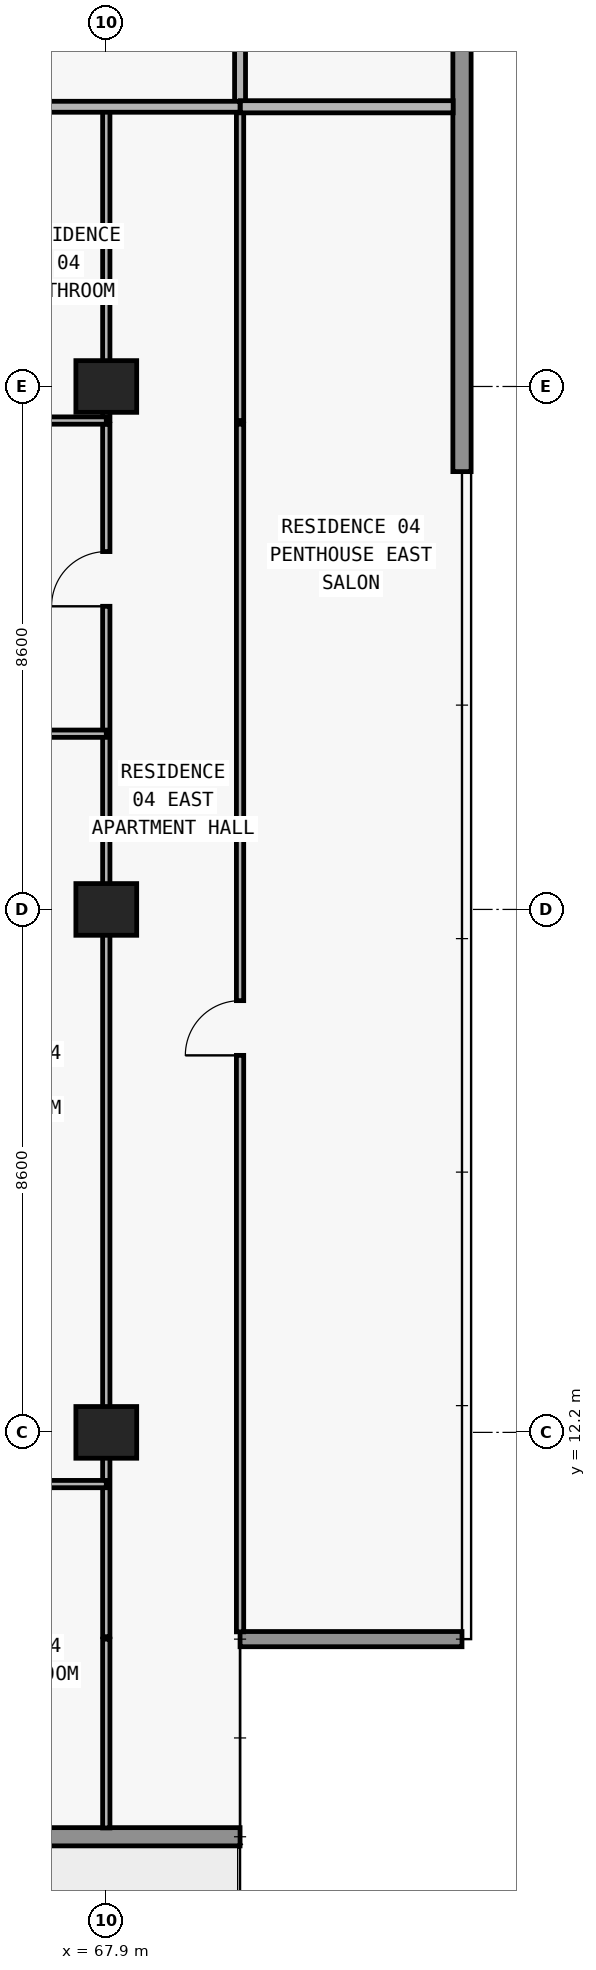
"""IFC4 building model, lengths in metres.
Left out: names, types, materials, properties, quantities, classifications, styles, units other than length and angle.
Written with IfcOpenShell. Run it as: python <this file> out.ifc"""

import sys

from ifc_helpers import new_model, si_unit, direction, frame, frame_2d, origin, origin_2d, place, context, subcontext, project, spatial, rectangle, extrude, element, fill, save


model = new_model("IFC4")
c1 = context("Model", 3, precision=1e-05, world=origin(), true_north=direction((0.0, 1.0)))
c2 = subcontext(c1, "Body", "Model", "MODEL_VIEW")
j1 = project(units=[si_unit("LENGTHUNIT", "METRE"), si_unit("PLANEANGLEUNIT", "RADIAN")], contexts=[c1])
p1 = place(None, origin())
s1 = spatial("IfcSite", under=j1, at=p1, CompositionType="ELEMENT")
p2 = place(p1, origin())
s2 = spatial("IfcBuilding", under=s1, at=p2, CompositionType="ELEMENT")
p3 = place(p2, frame((0.0, 0.0, 132.3)))
s3 = spatial("IfcBuildingStorey", under=s2, at=p3, CompositionType="ELEMENT", Elevation=132.3)
for number, where, z_axis, x_axis in (
    (1, (67.9, 12.2, 0.0), (0.0, 0.0, 1.0), (1.0, 0.0, 0.0)),
    (2, (67.9, 20.8, 0.0), (0.0, 0.0, 1.0), (1.0, 0.0, 0.0)),
    (3, (67.9, 29.4, 0.0), (0.0, 0.0, 1.0), (1.0, 0.0, 0.0)),
):
    element("IfcColumn", number, at=place(p3, frame(where, z_axis=z_axis, x_axis=x_axis)), inside=s3, PredefinedType="COLUMN", context=c2, shape_type="SweptSolid", body=[
        extrude(rectangle(XDim=1.0, YDim=0.85, at=origin_2d()), origin(), (0.0, 0.0, 1.0), 3.05),
    ])
p4 = place(p3, frame((70.1, 5.55, 0.0), z_axis=(0.0, 0.0, 1.0), x_axis=(-1.0, 0.0, 0.0)))
e4 = element("IfcWall", 4, at=p4, inside=s3, PredefinedType="STANDARD", context=c2, shape_type="SweptSolid", body=[
    extrude(rectangle(XDim=62.4, YDim=0.3, at=frame_2d((31.2, 0.0))), origin(), (0.0, 0.0, 1.0), 3.05),
])
p5 = place(p4, frame((57.29, 0.0, 0.0)))
e5 = element("IfcOpeningElement", 5, at=p5, cuts=e4, PredefinedType="OPENING", context=c2, shape_type="SweptSolid", body=[
    extrude(rectangle(XDim=2.0, YDim=2.3, at=frame_2d((1.0, 1.15))), frame((0.0, 0.16, 0.0), z_axis=(0.0, -1.0, 0.0), x_axis=(1.0, 0.0, 0.0)), (0.0, 0.0, 1.0), 0.32),
])
p6 = place(p4, frame((52.61, 0.0, 0.65)))
e6 = element("IfcOpeningElement", 6, at=p6, cuts=e4, PredefinedType="OPENING", context=c2, shape_type="SweptSolid", body=[
    extrude(rectangle(XDim=2.6, YDim=1.85, at=frame_2d((1.3, 0.925))), frame((0.0, 0.16, 0.0), z_axis=(0.0, -1.0, 0.0), x_axis=(1.0, 0.0, 0.0)), (0.0, 0.0, 1.0), 0.32),
])
p7 = place(p4, frame((46.5, 0.0, 0.85)))
e7 = element("IfcOpeningElement", 7, at=p7, cuts=e4, PredefinedType="OPENING", context=c2, shape_type="SweptSolid", body=[
    extrude(rectangle(XDim=2.2, YDim=1.55, at=frame_2d((1.1, 0.775))), frame((0.0, 0.16, 0.0), z_axis=(0.0, -1.0, 0.0), x_axis=(1.0, 0.0, 0.0)), (0.0, 0.0, 1.0), 0.32),
])
p8 = place(p4, frame((40.49, 0.0, 0.0)))
e8 = element("IfcOpeningElement", 8, at=p8, cuts=e4, PredefinedType="OPENING", context=c2, shape_type="SweptSolid", body=[
    extrude(rectangle(XDim=2.0, YDim=2.3, at=frame_2d((1.0, 1.15))), frame((0.0, 0.16, 0.0), z_axis=(0.0, -1.0, 0.0), x_axis=(1.0, 0.0, 0.0)), (0.0, 0.0, 1.0), 0.32),
])
p9 = place(p4, frame((35.81, 0.0, 0.65)))
e9 = element("IfcOpeningElement", 9, at=p9, cuts=e4, PredefinedType="OPENING", context=c2, shape_type="SweptSolid", body=[
    extrude(rectangle(XDim=2.6, YDim=1.85, at=frame_2d((1.3, 0.925))), frame((0.0, 0.16, 0.0), z_axis=(0.0, -1.0, 0.0), x_axis=(1.0, 0.0, 0.0)), (0.0, 0.0, 1.0), 0.32),
])
p10 = place(p4, frame((30.1, 0.0, 0.85)))
e10 = element("IfcOpeningElement", 10, at=p10, cuts=e4, PredefinedType="OPENING", context=c2, shape_type="SweptSolid", body=[
    extrude(rectangle(XDim=2.2, YDim=1.55, at=frame_2d((1.1, 0.775))), frame((0.0, 0.16, 0.0), z_axis=(0.0, -1.0, 0.0), x_axis=(1.0, 0.0, 0.0)), (0.0, 0.0, 1.0), 0.32),
])
p11 = place(p4, frame((22.1, 0.0, 0.85)))
e11 = element("IfcOpeningElement", 11, at=p11, cuts=e4, PredefinedType="OPENING", context=c2, shape_type="SweptSolid", body=[
    extrude(rectangle(XDim=2.2, YDim=1.55, at=frame_2d((1.1, 0.775))), frame((0.0, 0.16, 0.0), z_axis=(0.0, -1.0, 0.0), x_axis=(1.0, 0.0, 0.0)), (0.0, 0.0, 1.0), 0.32),
])
p12 = place(p4, frame((16.026, 0.0, 0.0)))
e12 = element("IfcOpeningElement", 12, at=p12, cuts=e4, PredefinedType="OPENING", context=c2, shape_type="SweptSolid", body=[
    extrude(rectangle(XDim=2.0, YDim=2.3, at=frame_2d((1.0, 1.15))), frame((0.0, 0.16, 0.0), z_axis=(0.0, -1.0, 0.0), x_axis=(1.0, 0.0, 0.0)), (0.0, 0.0, 1.0), 0.32),
])
p13 = place(p4, frame((11.726, 0.0, 0.85)))
e13 = element("IfcOpeningElement", 13, at=p13, cuts=e4, PredefinedType="OPENING", context=c2, shape_type="SweptSolid", body=[
    extrude(rectangle(XDim=2.2, YDim=1.55, at=frame_2d((1.1, 0.775))), frame((0.0, 0.16, 0.0), z_axis=(0.0, -1.0, 0.0), x_axis=(1.0, 0.0, 0.0)), (0.0, 0.0, 1.0), 0.32),
])
p14 = place(p4, frame((7.29, 0.0, 0.0)))
e14 = element("IfcOpeningElement", 14, at=p14, cuts=e4, PredefinedType="OPENING", context=c2, shape_type="SweptSolid", body=[
    extrude(rectangle(XDim=2.0, YDim=2.3, at=frame_2d((1.0, 1.15))), frame((0.0, 0.16, 0.0), z_axis=(0.0, -1.0, 0.0), x_axis=(1.0, 0.0, 0.0)), (0.0, 0.0, 1.0), 0.32),
])
p15 = place(p4, frame((3.19, 0.0, 0.85)))
e15 = element("IfcOpeningElement", 15, at=p15, cuts=e4, PredefinedType="OPENING", context=c2, shape_type="SweptSolid", body=[
    extrude(rectangle(XDim=1.8, YDim=1.55, at=frame_2d((0.9, 0.775))), frame((0.0, 0.16, 0.0), z_axis=(0.0, -1.0, 0.0), x_axis=(1.0, 0.0, 0.0)), (0.0, 0.0, 1.0), 0.32),
])
p16 = place(p3, frame((70.1, 8.8, 0.0), z_axis=(0.0, 0.0, 1.0), x_axis=(1.0, 0.0, 0.0)))
e16 = element("IfcWall", 16, at=p16, inside=s3, PredefinedType="ELEMENTEDWALL", context=c2, shape_type="SweptSolid", body=[
    extrude(rectangle(XDim=3.65, YDim=0.25, at=frame_2d((1.825, 0.0))), origin(), (0.0, 0.0, 1.0), 3.05),
])
p17 = place(p3, frame((73.75, 47.2, 0.0), z_axis=(0.0, 0.0, 1.0), x_axis=(0.0, -1.0, 0.0)))
e17 = element("IfcWall", 17, at=p17, inside=s3, PredefinedType="STANDARD", context=c2, shape_type="SweptSolid", body=[
    extrude(rectangle(XDim=19.2, YDim=0.3, at=frame_2d((9.6, 0.0))), origin(), (0.0, 0.0, 1.0), 3.05),
])
p18 = place(p3, frame((67.9, 5.695, 0.0), z_axis=(0.0, 0.0, 1.0), x_axis=(0.0, 1.0, 0.0)))
e18 = element("IfcWall", 18, at=p18, inside=s3, PredefinedType="PARTITIONING", context=c2, shape_type="SweptSolid", body=[
    extrude(rectangle(XDim=3.105, YDim=0.12, at=frame_2d((1.552, 0.0))), origin(), (0.0, 0.0, 1.0), 3.05),
])
p19 = place(p3, frame((67.9, 8.84, 0.0), z_axis=(0.0, 0.0, 1.0), x_axis=(0.0, 1.0, 0.0)))
e19 = element("IfcWall", 19, at=p19, inside=s3, PredefinedType="PARTITIONING", context=c2, shape_type="SweptSolid", body=[
    extrude(rectangle(XDim=19.94, YDim=0.12, at=frame_2d((9.97, 0.0))), origin(), (0.0, 0.0, 1.0), 2.174),
])
p20 = place(p19, frame((16.945, 0.0, 0.0)))
e20 = element("IfcOpeningElement", 20, at=p20, cuts=e19, PredefinedType="OPENING", context=c2, shape_type="SweptSolid", body=[
    extrude(rectangle(XDim=0.9, YDim=2.124, at=frame_2d((0.45, 1.062))), frame((0.0, 0.07, 0.0), z_axis=(0.0, -1.0, 0.0), x_axis=(1.0, 0.0, 0.0)), (0.0, 0.0, 1.0), 0.14),
])
p21 = place(p3, frame((67.9, 28.84, 0.0), z_axis=(0.0, 0.0, 1.0), x_axis=(0.0, 1.0, 0.0)))
e21 = element("IfcWall", 21, at=p21, inside=s3, PredefinedType="PARTITIONING", context=c2, shape_type="SweptSolid", body=[
    extrude(rectangle(XDim=5.16, YDim=0.12, at=frame_2d((2.58, 0.0))), origin(), (0.0, 0.0, 1.0), 2.174),
])
p22 = place(p3, frame((70.1, 8.92, 0.0), z_axis=(0.0, 0.0, 1.0), x_axis=(0.0, 1.0, 0.0)))
e22 = element("IfcWall", 22, at=p22, inside=s3, PredefinedType="PARTITIONING", context=c2, shape_type="SweptSolid", body=[
    extrude(rectangle(XDim=19.86, YDim=0.12, at=frame_2d((9.93, 0.0))), origin(), (0.0, 0.0, 1.0), 3.05),
])
p23 = place(p22, frame((9.48, 0.0, 0.0)))
e23 = element("IfcOpeningElement", 23, at=p23, cuts=e22, PredefinedType="OPENING", context=c2, shape_type="SweptSolid", body=[
    extrude(rectangle(XDim=0.9, YDim=2.15, at=frame_2d((0.45, 1.075))), frame((0.0, 0.07, 0.0), z_axis=(0.0, -1.0, 0.0), x_axis=(1.0, 0.0, 0.0)), (0.0, 0.0, 1.0), 0.14),
])
p24 = place(p3, frame((70.1, 28.84, 0.0), z_axis=(0.0, 0.0, 1.0), x_axis=(0.0, 1.0, 0.0)))
e24 = element("IfcWall", 24, at=p24, inside=s3, PredefinedType="PARTITIONING", context=c2, shape_type="SweptSolid", body=[
    extrude(rectangle(XDim=5.16, YDim=0.12, at=frame_2d((2.58, 0.0))), origin(), (0.0, 0.0, 1.0), 3.05),
])
p25 = place(p3, frame((70.1, 34.005, 0.0), z_axis=(0.0, 0.0, 1.0), x_axis=(0.0, 1.0, 0.0)))
e25 = element("IfcWall", 25, at=p25, inside=s3, PredefinedType="PARTITIONING", context=c2, shape_type="SweptSolid", body=[
    extrude(rectangle(XDim=2.945, YDim=0.18, at=frame_2d((1.473, 0.0))), origin(), (0.0, 0.0, 1.0), 3.05),
])
p26 = place(p3, frame((64.12, 11.35, 0.0), z_axis=(0.0, 0.0, 1.0), x_axis=(1.0, 0.0, 0.0)))
e26 = element("IfcWall", 26, at=p26, inside=s3, PredefinedType="PARTITIONING", context=c2, shape_type="SweptSolid", body=[
    extrude(rectangle(XDim=3.78, YDim=0.12, at=frame_2d((1.89, 0.0))), origin(), (0.0, 0.0, 1.0), 3.05),
])
p27 = place(p26, frame((1.44, 0.0, 0.0)))
e27 = element("IfcOpeningElement", 27, at=p27, cuts=e26, PredefinedType="OPENING", context=c2, shape_type="SweptSolid", body=[
    extrude(rectangle(XDim=0.9, YDim=2.15, at=frame_2d((0.45, 1.075))), frame((0.0, 0.07, 0.0), z_axis=(0.0, -1.0, 0.0), x_axis=(1.0, 0.0, 0.0)), (0.0, 0.0, 1.0), 0.14),
])
p28 = place(p3, frame((59.55, 23.69, 0.0), z_axis=(0.0, 0.0, 1.0), x_axis=(1.0, 0.0, 0.0)))
e28 = element("IfcWall", 28, at=p28, inside=s3, PredefinedType="PARTITIONING", context=c2, shape_type="SweptSolid", body=[
    extrude(rectangle(XDim=8.35, YDim=0.12, at=frame_2d((4.175, 0.0))), origin(), (0.0, 0.0, 1.0), 3.05),
])
p29 = place(p28, frame((1.668, 0.0, 0.0)))
e29 = element("IfcOpeningElement", 29, at=p29, cuts=e28, PredefinedType="OPENING", context=c2, shape_type="SweptSolid", body=[
    extrude(rectangle(XDim=0.9, YDim=2.15, at=frame_2d((0.45, 1.075))), frame((0.0, 0.07, 0.0), z_axis=(0.0, -1.0, 0.0), x_axis=(1.0, 0.0, 0.0)), (0.0, 0.0, 1.0), 0.14),
])
p30 = place(p28, frame((6.01, 0.0, 0.0)))
e30 = element("IfcOpeningElement", 30, at=p30, cuts=e28, PredefinedType="OPENING", context=c2, shape_type="SweptSolid", body=[
    extrude(rectangle(XDim=0.9, YDim=2.15, at=frame_2d((0.45, 1.075))), frame((0.0, 0.07, 0.0), z_axis=(0.0, -1.0, 0.0), x_axis=(1.0, 0.0, 0.0)), (0.0, 0.0, 1.0), 0.14),
])
p31 = place(p3, frame((59.55, 28.84, 0.0), z_axis=(0.0, 0.0, 1.0), x_axis=(1.0, 0.0, 0.0)))
e31 = element("IfcWall", 31, at=p31, inside=s3, PredefinedType="PARTITIONING", context=c2, shape_type="SweptSolid", body=[
    extrude(rectangle(XDim=8.35, YDim=0.12, at=frame_2d((4.175, 0.0))), origin(), (0.0, 0.0, 1.0), 3.05),
])
p32 = place(p31, frame((1.668, 0.0, 0.0)))
e32 = element("IfcOpeningElement", 32, at=p32, cuts=e31, PredefinedType="OPENING", context=c2, shape_type="SweptSolid", body=[
    extrude(rectangle(XDim=0.9, YDim=2.15, at=frame_2d((0.45, 1.075))), frame((0.0, 0.07, 0.0), z_axis=(0.0, -1.0, 0.0), x_axis=(1.0, 0.0, 0.0)), (0.0, 0.0, 1.0), 0.14),
])
p33 = place(p3, frame((59.55, 34.0, 0.0), z_axis=(0.0, 0.0, 1.0), x_axis=(1.0, 0.0, 0.0)))
e33 = element("IfcWall", 33, at=p33, inside=s3, PredefinedType="PARTITIONING", context=c2, shape_type="SweptSolid", body=[
    extrude(rectangle(XDim=10.55, YDim=0.18, at=frame_2d((5.275, 0.0))), origin(), (0.0, 0.0, 1.0), 3.05),
])
p34 = place(p33, frame((2.677, 0.0, 0.0)))
e34 = element("IfcOpeningElement", 34, at=p34, cuts=e33, PredefinedType="OPENING", context=c2, shape_type="SweptSolid", body=[
    extrude(rectangle(XDim=1.0, YDim=2.2, at=frame_2d((0.5, 1.1))), frame((0.0, 0.1, 0.0), z_axis=(0.0, -1.0, 0.0), x_axis=(1.0, 0.0, 0.0)), (0.0, 0.0, 1.0), 0.2),
])
p35 = place(p3, frame((70.105, 34.0, 0.0), z_axis=(0.0, 0.0, 1.0), x_axis=(1.0, 0.0, 0.0)))
e35 = element("IfcWall", 35, at=p35, inside=s3, PredefinedType="PARTITIONING", context=c2, shape_type="SweptSolid", body=[
    extrude(rectangle(XDim=3.5, YDim=0.2, at=frame_2d((1.75, 0.0))), origin(), (0.0, 0.0, 1.0), 3.05),
])
p36 = place(p20, origin())
e36 = element("IfcDoor", 36, at=p36, inside=s3, OperationType="SINGLE_SWING_LEFT", PredefinedType="DOOR", context=c2, shape_type="SweptSolid", body=[
    extrude(rectangle(XDim=0.9, YDim=2.124, at=frame_2d((0.45, 1.062))), frame((0.0, 0.025, 0.0), z_axis=(0.0, -1.0, 0.0), x_axis=(1.0, 0.0, 0.0)), (0.0, 0.0, 1.0), 0.05),
])
fill(e20, e36)
p37 = place(p23, origin())
e37 = element("IfcDoor", 37, at=p37, inside=s3, OperationType="SINGLE_SWING_LEFT", PredefinedType="DOOR", context=c2, shape_type="SweptSolid", body=[
    extrude(rectangle(XDim=0.9, YDim=2.15, at=frame_2d((0.45, 1.075))), frame((0.0, 0.025, 0.0), z_axis=(0.0, -1.0, 0.0), x_axis=(1.0, 0.0, 0.0)), (0.0, 0.0, 1.0), 0.05),
])
fill(e23, e37)
save(model, sys.argv[1])
